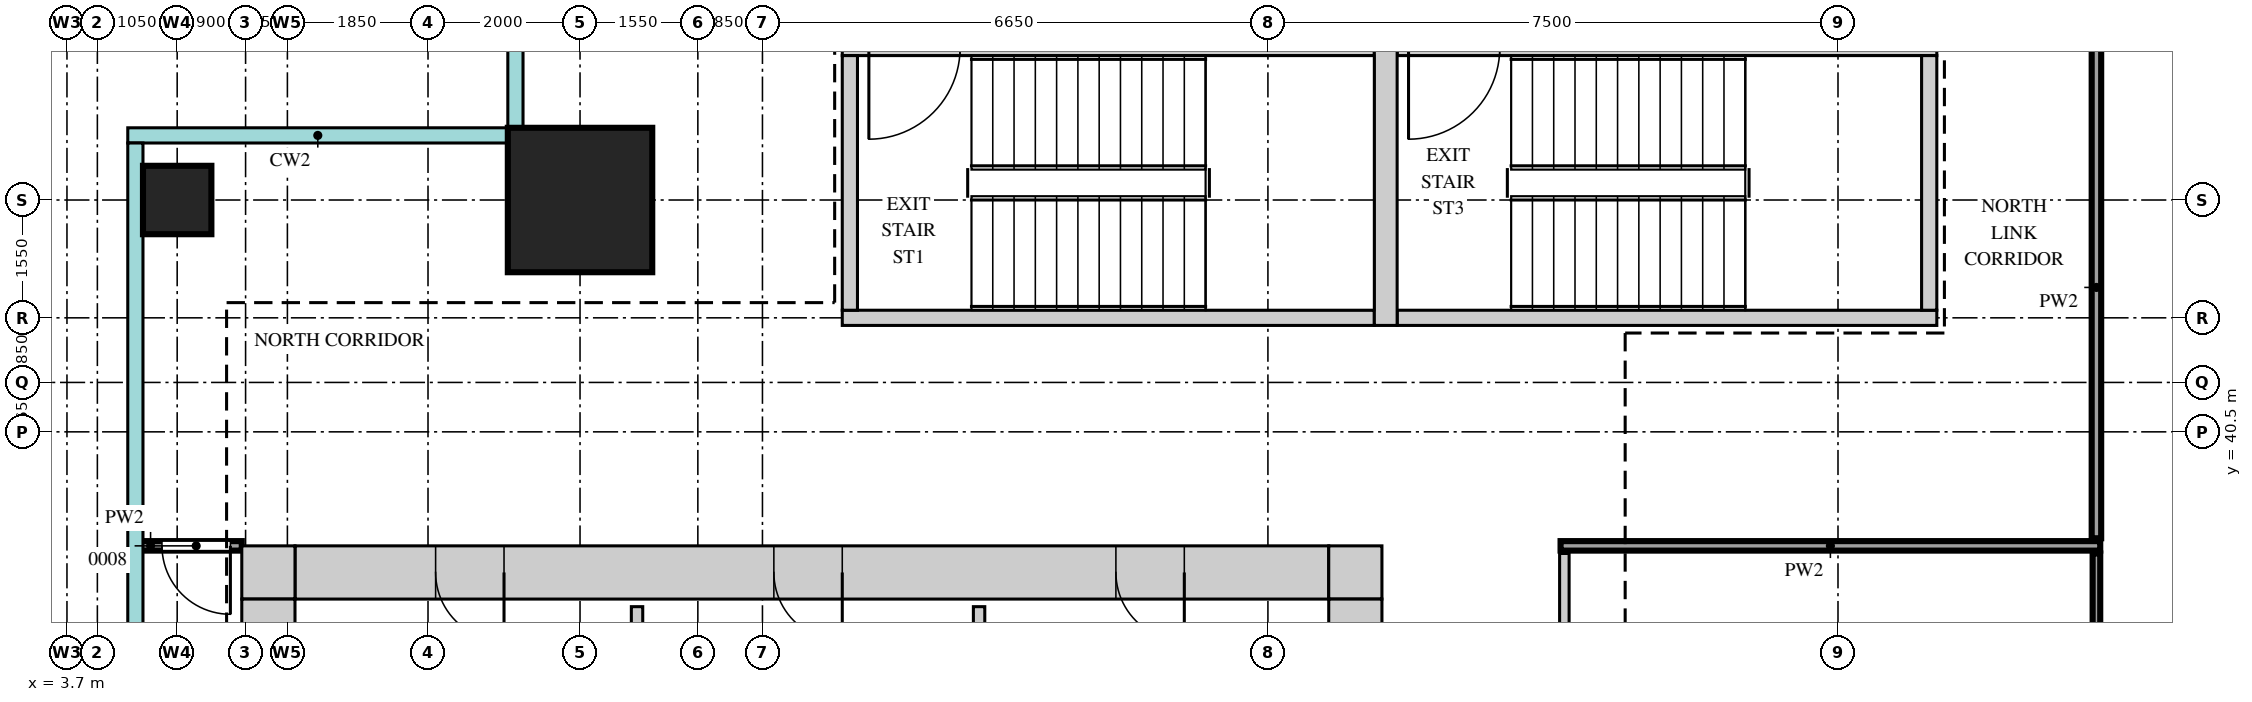
"""IFC4 building model, lengths in metres.
Left out: names, types, materials, properties, quantities, classifications, styles, units other than length and angle.
Written with IfcOpenShell. Run it as: python <this file> out.ifc"""

import sys

from ifc_helpers import new_model, si_unit, direction, frame, frame_2d, origin, origin_2d, place, context, subcontext, project, spatial, rectangle, extrude, source, transform, mapped, element, fill, save


model = new_model("IFC4")
c1 = context("Model", 3, precision=1e-05, world=origin(), true_north=direction((0.0, 1.0)))
c2 = subcontext(c1, "Body", "Model", "MODEL_VIEW")
j1 = project(units=[si_unit("LENGTHUNIT", "METRE"), si_unit("PLANEANGLEUNIT", "RADIAN")], contexts=[c1])
p1 = place(None, origin())
s1 = spatial("IfcSite", under=j1, at=p1, CompositionType="ELEMENT")
p2 = place(p1, origin())
s2 = spatial("IfcBuilding", under=s1, at=p2, CompositionType="ELEMENT")
p3 = place(p2, frame((0.0, 0.0, 242.2)))
s3 = spatial("IfcBuildingStorey", under=s2, at=p3, CompositionType="ELEMENT", Elevation=242.2)
m1 = source(origin(), c2, "Body", "SweptSolid", [
    extrude(rectangle(XDim=13.6, YDim=0.7, at=frame_2d((6.8, 0.0))), origin(), (0.0, 0.0, 1.0), 3.75),
])
p4 = place(p3, frame((6.7, 38.65, 0.0), z_axis=(0.0, 0.0, 1.0), x_axis=(1.0, 0.0, 0.0)))
e1 = element("IfcWall", 1, at=p4, inside=s3, PredefinedType="SHEAR", context=c2, shape_type="MappedRepresentation", body=[
    mapped(m1, transform((0.0, 0.0, 0.0))),
])
m2 = source(origin(), c2, "Body", "SweptSolid", [
    extrude(rectangle(XDim=0.9, YDim=2.1, at=frame_2d((0.45, 1.05))), frame((0.0, 0.36, 0.0), z_axis=(0.0, -1.0, 0.0), x_axis=(1.0, 0.0, 0.0)), (0.0, 0.0, 1.0), 0.72),
])
p5 = place(p4, frame((1.85, 0.0, 0.0)))
e2 = element("IfcOpeningElement", 2, at=p5, cuts=e1, PredefinedType="OPENING", context=c2, shape_type="MappedRepresentation", body=[
    mapped(m2, transform((0.0, 0.0, 0.0))),
])
p6 = place(p4, frame((6.3, 0.0, 0.0)))
e3 = element("IfcOpeningElement", 3, at=p6, cuts=e1, PredefinedType="OPENING", context=c2, shape_type="MappedRepresentation", body=[
    mapped(m2, transform((0.0, 0.0, 0.0))),
])
p7 = place(p4, frame((10.8, 0.0, 0.0)))
e4 = element("IfcOpeningElement", 4, at=p7, cuts=e1, PredefinedType="OPENING", context=c2, shape_type="MappedRepresentation", body=[
    mapped(m2, transform((0.0, 0.0, 0.0))),
])
m3 = source(origin(), c2, "Body", "SweptSolid", [
    extrude(rectangle(XDim=0.7, YDim=0.7, at=frame_2d((0.35, 0.0))), origin(), (0.0, 0.0, 1.0), 3.75),
])
for number, where, z_axis, x_axis in (
    (5, (20.3, 38.65, 0.0), (0.0, 0.0, 1.0), (1.0, 0.0, 0.0)),
    (6, (6.0, 38.65, 0.0), (0.0, 0.0, 1.0), (1.0, 0.0, 0.0)),
):
    element("IfcWall", number, at=place(p3, frame(where, z_axis=z_axis, x_axis=x_axis)), inside=s3, PredefinedType="SHEAR", context=c2, shape_type="MappedRepresentation", body=[
        mapped(m3, transform((0.0, 0.0, 0.0))),
    ])
m4 = source(origin(), c2, "Body", "SweptSolid", [
    extrude(rectangle(XDim=22.6, YDim=0.7, at=frame_2d((11.3, 0.0))), origin(), (0.0, 0.0, 1.0), 3.75),
])
p8 = place(p3, frame((20.65, 15.7, 0.0), z_axis=(0.0, 0.0, 1.0), x_axis=(0.0, 1.0, 0.0)))
e7 = element("IfcWall", 7, at=p8, inside=s3, PredefinedType="SHEAR", context=c2, shape_type="MappedRepresentation", body=[
    mapped(m4, transform((0.0, 0.0, 0.0))),
])
m5 = source(origin(), c2, "Body", "SweptSolid", [
    extrude(rectangle(XDim=1.8, YDim=2.1, at=frame_2d((0.9, 1.05))), frame((0.0, 0.36, 0.0), z_axis=(0.0, -1.0, 0.0), x_axis=(1.0, 0.0, 0.0)), (0.0, 0.0, 1.0), 0.72),
])
p9 = place(p8, frame((10.8, 0.0, 0.0)))
e8 = element("IfcOpeningElement", 8, at=p9, cuts=e7, PredefinedType="OPENING", context=c2, shape_type="MappedRepresentation", body=[
    mapped(m5, transform((0.0, 0.0, 0.0))),
])
p10 = place(p8, frame((0.45, 0.0, 0.0)))
e9 = element("IfcOpeningElement", 9, at=p10, cuts=e7, PredefinedType="OPENING", context=c2, shape_type="MappedRepresentation", body=[
    mapped(m2, transform((0.0, 0.0, 0.0))),
])
m6 = source(origin(), c2, "Body", "SweptSolid", [
    extrude(rectangle(XDim=1.0, YDim=2.1, at=frame_2d((0.5, 1.05))), frame((0.0, 0.36, 0.0), z_axis=(0.0, -1.0, 0.0), x_axis=(1.0, 0.0, 0.0)), (0.0, 0.0, 1.0), 0.72),
])
p11 = place(p8, frame((2.2, 0.0, 0.0)))
e10 = element("IfcOpeningElement", 10, at=p11, cuts=e7, PredefinedType="OPENING", context=c2, shape_type="MappedRepresentation", body=[
    mapped(m6, transform((0.0, 0.0, 0.0))),
])
p12 = place(p8, frame((5.0, 0.0, 0.0)))
e11 = element("IfcOpeningElement", 11, at=p12, cuts=e7, PredefinedType="OPENING", context=c2, shape_type="MappedRepresentation", body=[
    mapped(m2, transform((0.0, 0.0, 0.0))),
])
p13 = place(p3, frame((6.35, 15.7, 0.0), z_axis=(0.0, 0.0, 1.0), x_axis=(0.0, 1.0, 0.0)))
e12 = element("IfcWall", 12, at=p13, inside=s3, PredefinedType="SHEAR", context=c2, shape_type="MappedRepresentation", body=[
    mapped(m4, transform((0.0, 0.0, 0.0))),
])
m7 = source(origin(), c2, "Body", "SweptSolid", [
    extrude(rectangle(XDim=7.0, YDim=0.2, at=frame_2d((3.5, 0.0))), origin(), (0.0, 0.0, 1.0), 3.75),
])
p14 = place(p3, frame((13.9, 45.55, 0.0), z_axis=(0.0, 0.0, 1.0), x_axis=(1.0, 0.0, 0.0)))
e13 = element("IfcWall", 13, at=p14, inside=s3, PredefinedType="SHEAR", context=c2, shape_type="MappedRepresentation", body=[
    mapped(m7, transform((0.0, 0.0, 0.0))),
])
m8 = source(origin(), c2, "Body", "SweptSolid", [
    extrude(rectangle(XDim=1.2, YDim=2.1, at=frame_2d((0.6, 1.05))), frame((0.0, 0.11, 0.0), z_axis=(0.0, -1.0, 0.0), x_axis=(1.0, 0.0, 0.0)), (0.0, 0.0, 1.0), 0.22),
])
p15 = place(p14, frame((0.35, 0.0, 0.0)))
e14 = element("IfcOpeningElement", 14, at=p15, cuts=e13, PredefinedType="OPENING", context=c2, shape_type="MappedRepresentation", body=[
    mapped(m8, transform((0.0, 0.0, 0.0))),
])
p16 = place(p3, frame((13.9, 42.0, 0.0), z_axis=(0.0, 0.0, 1.0), x_axis=(1.0, 0.0, 0.0)))
e15 = element("IfcWall", 15, at=p16, inside=s3, PredefinedType="SHEAR", context=c2, shape_type="MappedRepresentation", body=[
    mapped(m7, transform((0.0, 0.0, 0.0))),
])
m9 = source(origin(), c2, "Body", "SweptSolid", [
    extrude(rectangle(XDim=7.1, YDim=0.2, at=frame_2d((3.55, 0.0))), origin(), (0.0, 0.0, 1.0), 3.75),
])
p17 = place(p3, frame((21.2, 45.55, 0.0), z_axis=(0.0, 0.0, 1.0), x_axis=(1.0, 0.0, 0.0)))
e16 = element("IfcWall", 16, at=p17, inside=s3, PredefinedType="SHEAR", context=c2, shape_type="MappedRepresentation", body=[
    mapped(m9, transform((0.0, 0.0, 0.0))),
])
p18 = place(p17, frame((0.15, 0.0, 0.0)))
e17 = element("IfcOpeningElement", 17, at=p18, cuts=e16, PredefinedType="OPENING", context=c2, shape_type="MappedRepresentation", body=[
    mapped(m8, transform((0.0, 0.0, 0.0))),
])
p19 = place(p3, frame((21.2, 42.0, 0.0), z_axis=(0.0, 0.0, 1.0), x_axis=(1.0, 0.0, 0.0)))
e18 = element("IfcWall", 18, at=p19, inside=s3, PredefinedType="SHEAR", context=c2, shape_type="MappedRepresentation", body=[
    mapped(m9, transform((0.0, 0.0, 0.0))),
])
m10 = source(origin(), c2, "Body", "SweptSolid", [
    extrude(rectangle(XDim=3.75, YDim=0.3, at=frame_2d((1.875, 0.0))), origin(), (0.0, 0.0, 1.0), 3.75),
])
p20 = place(p3, frame((21.05, 41.9, 0.0), z_axis=(0.0, 0.0, 1.0), x_axis=(0.0, 1.0, 0.0)))
e19 = element("IfcWall", 19, at=p20, inside=s3, PredefinedType="SHEAR", context=c2, shape_type="MappedRepresentation", body=[
    mapped(m10, transform((0.0, 0.0, 0.0))),
])
m11 = source(origin(), c2, "Body", "SweptSolid", [
    extrude(rectangle(XDim=3.35, YDim=0.2, at=frame_2d((1.675, 0.0))), origin(), (0.0, 0.0, 1.0), 3.75),
])
for number, where, z_axis, x_axis in (
    (20, (14.0, 42.1, 0.0), (0.0, 0.0, 1.0), (0.0, 1.0, 0.0)),
    (21, (28.2, 42.1, 0.0), (0.0, 0.0, 1.0), (0.0, 1.0, 0.0)),
):
    element("IfcWall", number, at=place(p3, frame(where, z_axis=z_axis, x_axis=x_axis)), inside=s3, PredefinedType="SHEAR", context=c2, shape_type="MappedRepresentation", body=[
        mapped(m11, transform((0.0, 0.0, 0.0))),
    ])
m12 = source(origin(), c2, "Body", "SweptSolid", [
    extrude(rectangle(XDim=1.9, YDim=1.9, at=origin_2d()), origin(), (0.0, 0.0, 1.0), 4.0),
])
p21 = place(p3, frame((10.45, 43.55, 0.0), z_axis=(0.0, 0.0, 1.0), x_axis=(1.0, 0.0, 0.0)))
e22 = element("IfcColumn", 22, at=p21, inside=s3, PredefinedType="COLUMN", context=c2, shape_type="MappedRepresentation", body=[
    mapped(m12, transform((0.0, 0.0, 0.0))),
])
m13 = source(origin(), c2, "Body", "SweptSolid", [
    extrude(rectangle(XDim=0.9, YDim=0.9, at=origin_2d()), origin(), (0.0, 0.0, 1.0), 3.75),
])
p22 = place(p3, frame((5.15, 43.55, 0.0), z_axis=(0.0, 0.0, 1.0), x_axis=(1.0, 0.0, 0.0)))
e23 = element("IfcColumn", 23, at=p22, inside=s3, PredefinedType="COLUMN", context=c2, shape_type="MappedRepresentation", body=[
    mapped(m13, transform((0.0, 0.0, 0.0))),
])
m14 = source(origin(), c2, "Body", "SweptSolid", [
    extrude(rectangle(XDim=11.4, YDim=0.125, at=frame_2d((5.7, 0.0))), origin(), (0.0, 0.0, 1.0), 3.8),
])
p23 = place(p3, frame((23.4, 27.5, 0.0), z_axis=(0.0, 0.0, 1.0), x_axis=(0.0, 1.0, 0.0)))
e24 = element("IfcWall", 24, at=p23, inside=s3, PredefinedType="PARTITIONING", context=c2, shape_type="MappedRepresentation", body=[
    mapped(m14, transform((0.0, 0.0, 0.0))),
])
m15 = source(origin(), c2, "Body", "SweptSolid", [
    extrude(rectangle(XDim=0.9, YDim=2.1, at=frame_2d((0.45, 1.05))), frame((0.0, 0.073, 0.0), z_axis=(0.0, -1.0, 0.0), x_axis=(1.0, 0.0, 0.0)), (0.0, 0.0, 1.0), 0.145),
])
p24 = place(p23, frame((5.4, 0.0, 0.0)))
e25 = element("IfcOpeningElement", 25, at=p24, cuts=e24, PredefinedType="OPENING", context=c2, shape_type="MappedRepresentation", body=[
    mapped(m15, transform((0.0, 0.0, 0.0))),
])
m16 = source(origin(), c2, "Body", "SweptSolid", [
    extrude(rectangle(XDim=11.4, YDim=0.1, at=frame_2d((5.7, 0.0))), origin(), (0.0, 0.0, 1.0), 3.8),
])
p25 = place(p3, frame((30.4, 27.5, 0.0), z_axis=(0.0, 0.0, 1.0), x_axis=(0.0, 1.0, 0.0)))
e26 = element("IfcWall", 26, at=p25, inside=s3, PredefinedType="PARTITIONING", context=c2, shape_type="MappedRepresentation", body=[
    mapped(m16, transform((0.0, 0.0, 0.0))),
])
m17 = source(origin(), c2, "Body", "SweptSolid", [
    extrude(rectangle(XDim=6.0, YDim=0.15, at=frame_2d((3.0, 0.0))), origin(), (0.0, 0.0, 1.0), 3.8),
])
for number, where, z_axis, x_axis in (
    (27, (11.2, 32.2, 0.0), (0.0, 0.0, 1.0), (0.0, 1.0, 0.0)),
    (28, (15.7, 32.2, 0.0), (0.0, 0.0, 1.0), (0.0, 1.0, 0.0)),
):
    element("IfcWall", number, at=place(p3, frame(where, z_axis=z_axis, x_axis=x_axis)), inside=s3, PredefinedType="PARTITIONING", context=c2, shape_type="MappedRepresentation", body=[
        mapped(m17, transform((0.0, 0.0, 0.0))),
    ])
m18 = source(origin(), c2, "Body", "SweptSolid", [
    extrude(rectangle(XDim=1.35, YDim=0.125, at=frame_2d((0.675, 0.0))), origin(), (0.0, 0.0, 1.0), 3.8),
])
p26 = place(p3, frame((4.65, 39.0, 0.0), z_axis=(0.0, 0.0, 1.0), x_axis=(1.0, 0.0, 0.0)))
e29 = element("IfcWall", 29, at=p26, inside=s3, PredefinedType="PARTITIONING", context=c2, shape_type="MappedRepresentation", body=[
    mapped(m18, transform((0.0, 0.0, 0.0))),
])
p27 = place(p26, frame((0.3, 0.0, 0.0)))
e30 = element("IfcOpeningElement", 30, at=p27, cuts=e29, PredefinedType="OPENING", context=c2, shape_type="MappedRepresentation", body=[
    mapped(m15, transform((0.0, 0.0, 0.0))),
])
m19 = source(origin(), c2, "Body", "SweptSolid", [
    extrude(rectangle(XDim=7.1, YDim=0.125, at=frame_2d((3.55, 0.0))), origin(), (0.0, 0.0, 1.0), 3.8),
])
p28 = place(p3, frame((23.35, 39.0, 0.0), z_axis=(0.0, 0.0, 1.0), x_axis=(1.0, 0.0, 0.0)))
e31 = element("IfcWall", 31, at=p28, inside=s3, PredefinedType="PARTITIONING", context=c2, shape_type="MappedRepresentation", body=[
    mapped(m19, transform((0.0, 0.0, 0.0))),
])
m20 = source(origin(), c2, "Body", "SweptSolid", [
    extrude(rectangle(XDim=6.6, YDim=0.125, at=frame_2d((3.3, 0.0))), origin(), (0.0, 0.0, 1.0), 3.8),
])
p29 = place(p3, frame((30.4, 39.1, 0.0), z_axis=(0.0, 0.0, 1.0), x_axis=(0.0, 1.0, 0.0)))
e32 = element("IfcWall", 32, at=p29, inside=s3, PredefinedType="PARTITIONING", context=c2, shape_type="MappedRepresentation", body=[
    mapped(m20, transform((0.0, 0.0, 0.0))),
])
m21 = source(origin(), c2, "Body", "SweptSolid", [
    extrude(rectangle(XDim=0.9, YDim=2.1, at=frame_2d((0.45, 1.05))), frame((0.0, 0.3, 0.0), z_axis=(0.0, -1.0, 0.0), x_axis=(1.0, 0.0, 0.0)), (0.0, 0.0, 1.0), 0.6),
])
p30 = place(p5, origin())
e33 = element("IfcDoor", 33, at=p30, inside=s3, OperationType="SINGLE_SWING_RIGHT", PredefinedType="DOOR", context=c2, shape_type="MappedRepresentation", body=[
    mapped(m21, transform((0.0, 0.0, 0.0))),
])
fill(e2, e33)
p31 = place(p6, origin())
e34 = element("IfcDoor", 34, at=p31, inside=s3, OperationType="SINGLE_SWING_RIGHT", PredefinedType="DOOR", context=c2, shape_type="MappedRepresentation", body=[
    mapped(m21, transform((0.0, 0.0, 0.0))),
])
fill(e3, e34)
p32 = place(p7, origin())
e35 = element("IfcDoor", 35, at=p32, inside=s3, OperationType="SINGLE_SWING_RIGHT", PredefinedType="DOOR", context=c2, shape_type="MappedRepresentation", body=[
    mapped(m21, transform((0.0, 0.0, 0.0))),
])
fill(e4, e35)
m22 = source(origin(), c2, "Body", "SweptSolid", [
    extrude(rectangle(XDim=0.9, YDim=2.1, at=frame_2d((0.45, 1.05))), frame((0.0, 0.025, 0.0), z_axis=(0.0, -1.0, 0.0), x_axis=(1.0, 0.0, 0.0)), (0.0, 0.0, 1.0), 0.05),
])
p33 = place(p27, origin())
e36 = element("IfcDoor", 36, at=p33, inside=s3, OperationType="SINGLE_SWING_RIGHT", PredefinedType="DOOR", context=c2, shape_type="MappedRepresentation", body=[
    mapped(m22, transform((0.0, 0.0, 0.0))),
])
fill(e30, e36)
save(model, sys.argv[1])
